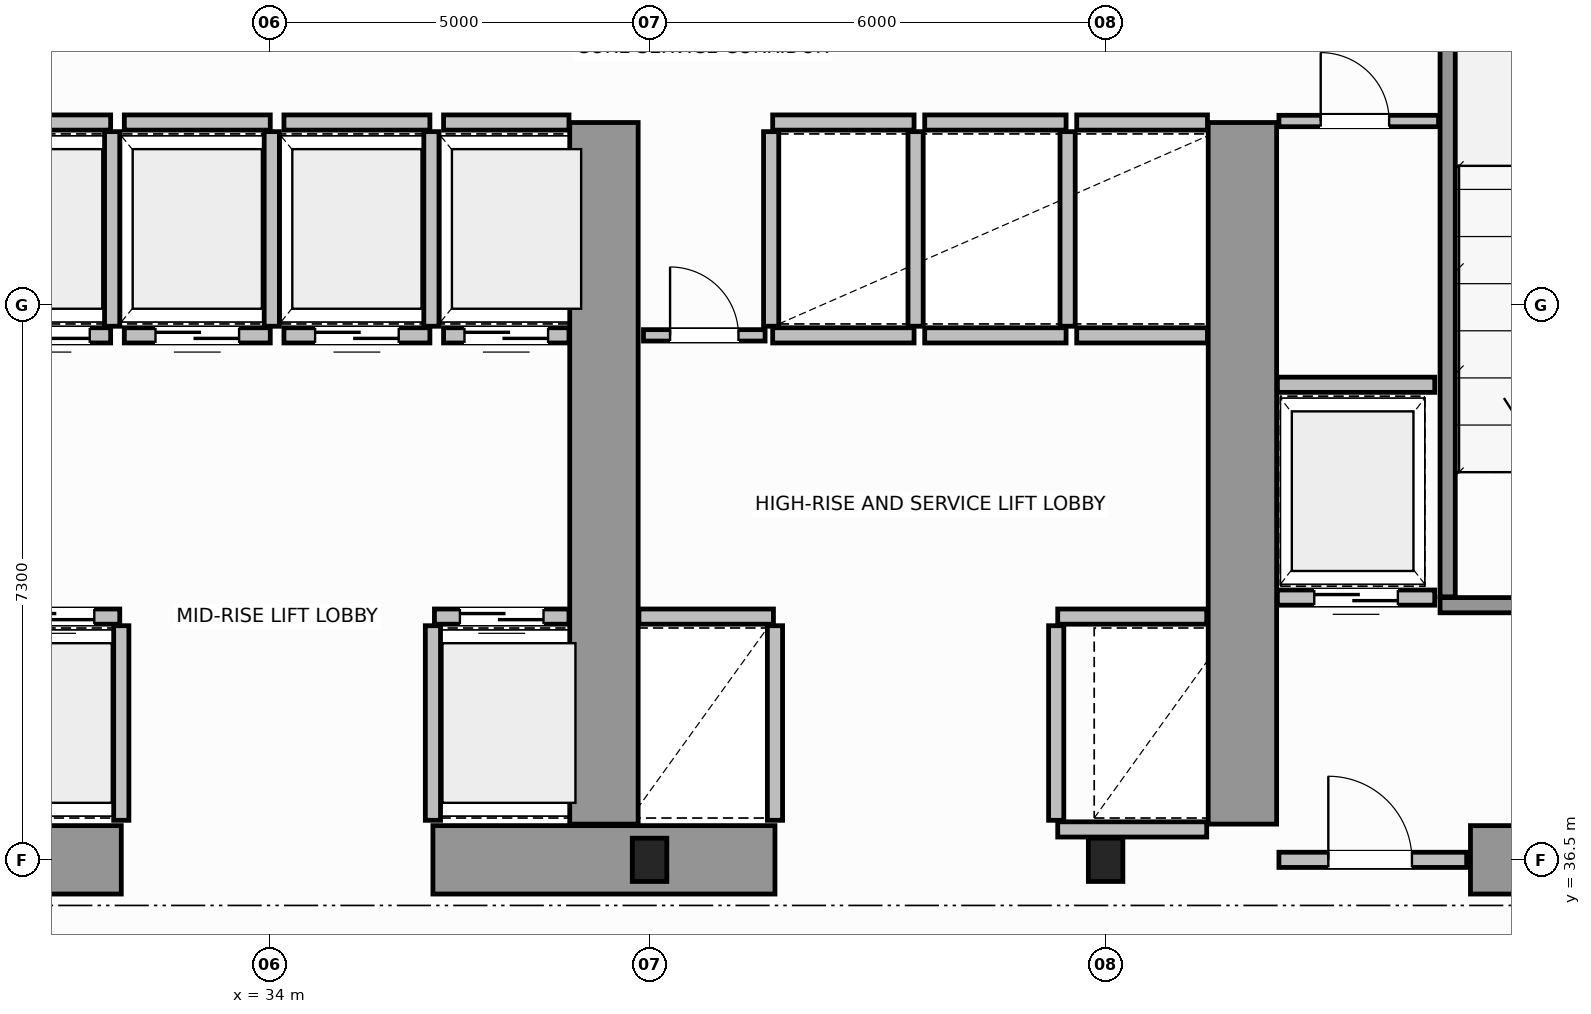
"""IFC4 building model, lengths in metres.
Left out: names, types, materials, properties, quantities, classifications, styles, units other than length and angle.
Written with IfcOpenShell. Run it as: python <this file> out.ifc"""

import sys

from ifc_helpers import new_model, si_unit, direction, frame, frame_2d, origin, origin_2d, place, context, subcontext, project, spatial, rectangle, i_section, extrude, source, transform, mapped, element, fill, save


model = new_model("IFC4")
c1 = context("Model", 3, precision=1e-05, world=origin(), true_north=direction((0.0, 1.0)))
c2 = subcontext(c1, "Body", "Model", "MODEL_VIEW")
j1 = project(units=[si_unit("LENGTHUNIT", "METRE"), si_unit("PLANEANGLEUNIT", "RADIAN")], contexts=[c1])
p1 = place(None, origin())
s1 = spatial("IfcSite", under=j1, at=p1, CompositionType="ELEMENT")
p2 = place(p1, origin())
s2 = spatial("IfcBuilding", under=s1, at=p2, CompositionType="ELEMENT")
p3 = place(p2, frame((0.0, 0.0, 10.0)))
s3 = spatial("IfcBuildingStorey", under=s2, at=p3, CompositionType="ELEMENT", Elevation=10.0)
m1 = source(origin(), c2, "Body", "SweptSolid", [
    extrude(i_section(OverallWidth=0.454, OverallDepth=0.569, WebThickness=0.078, FlangeThickness=0.08, FilletRadius=0.015, at=origin_2d()), origin(), (0.0, 0.0, 1.0), 4.4),
])
for number, where, z_axis, x_axis in (
    (1, (39.0, 36.5, 0.0), (0.0, 0.0, 1.0), (1.0, 0.0, 0.0)),
    (2, (45.0, 36.5, 0.0), (0.0, 0.0, 1.0), (1.0, 0.0, 0.0)),
):
    element("IfcColumn", number, at=place(p3, frame(where, z_axis=z_axis, x_axis=x_axis)), inside=s3, PredefinedType="COLUMN", context=c2, shape_type="MappedRepresentation", body=[
        mapped(m1, transform((0.0, 0.0, 0.0), scale=1.0)),
    ])
for number, where, z_axis, x_axis in (
    (3, (27.55, 36.5, 0.0), (0.0, 0.0, 1.0), (1.0, 0.0, 0.0)),
    (4, (36.15, 36.5, 0.0), (0.0, 0.0, 1.0), (1.0, 0.0, 0.0)),
):
    element("IfcWall", number, at=place(p3, frame(where, z_axis=z_axis, x_axis=x_axis)), inside=s3, PredefinedType="SHEAR", context=c2, shape_type="SweptSolid", body=[
        extrude(rectangle(XDim=4.5, YDim=0.9, at=frame_2d((2.25, 0.0))), origin(), (0.0, 0.0, 1.0), 4.4),
    ])
p4 = place(p3, frame((49.8, 36.5, 0.0), z_axis=(0.0, 0.0, 1.0), x_axis=(1.0, 0.0, 0.0)))
e5 = element("IfcWall", 5, at=p4, inside=s3, PredefinedType="SHEAR", context=c2, shape_type="SweptSolid", body=[
    extrude(rectangle(XDim=3.73, YDim=0.9, at=frame_2d((1.865, 0.0))), origin(), (0.0, 0.0, 1.0), 2.92),
])
for number, where, z_axis, x_axis in (
    (6, (38.4, 36.97, 0.0), (0.0, 0.0, 1.0), (0.0, 1.0, 0.0)),
    (7, (46.8, 36.97, 0.0), (0.0, 0.0, 1.0), (0.0, 1.0, 0.0)),
):
    element("IfcWall", number, at=place(p3, frame(where, z_axis=z_axis, x_axis=x_axis)), inside=s3, PredefinedType="SHEAR", context=c2, shape_type="SweptSolid", body=[
        extrude(rectangle(XDim=9.23, YDim=0.9, at=frame_2d((4.615, 0.0))), origin(), (0.0, 0.0, 1.0), 4.4),
    ])
p5 = place(p3, frame((49.4, 39.85, 0.0), z_axis=(0.0, 0.0, 1.0), x_axis=(1.0, 0.0, 0.0)))
e8 = element("IfcWall", 8, at=p5, inside=s3, PredefinedType="SOLIDWALL", context=c2, shape_type="SweptSolid", body=[
    extrude(rectangle(XDim=4.15, YDim=0.2, at=frame_2d((2.075, 0.0))), origin(), (0.0, 0.0, 1.0), 4.4),
])
p6 = place(p5, frame((1.325, 0.0, 0.0)))
e9 = element("IfcOpeningElement", 9, at=p6, cuts=e8, PredefinedType="OPENING", context=c2, shape_type="SweptSolid", body=[
    extrude(rectangle(XDim=1.1, YDim=2.15, at=frame_2d((0.55, 1.075))), frame((0.0, 0.11, 0.0), z_axis=(0.0, -1.0, 0.0), x_axis=(1.0, 0.0, 0.0)), (0.0, 0.0, 1.0), 0.22),
])
p7 = place(p3, frame((49.5, 39.96, 0.0), z_axis=(0.0, 0.0, 1.0), x_axis=(0.0, 1.0, 0.0)))
e10 = element("IfcWall", 10, at=p7, inside=s3, PredefinedType="SOLIDWALL", context=c2, shape_type="SweptSolid", body=[
    extrude(rectangle(XDim=9.93, YDim=0.2, at=frame_2d((4.965, 0.0))), origin(), (0.0, 0.0, 1.0), 4.4),
])
p8 = place(p3, frame((47.28, 36.5, 0.0), z_axis=(0.0, 0.0, 1.0), x_axis=(1.0, 0.0, 0.0)))
e11 = element("IfcWall", 11, at=p8, inside=s3, PredefinedType="SOLIDWALL", context=c2, shape_type="SweptSolid", body=[
    extrude(rectangle(XDim=2.47, YDim=0.2, at=frame_2d((1.235, 0.0))), origin(), (0.0, 0.0, 1.0), 2.91),
])
p9 = place(p8, frame((0.65, 0.0, 0.0)))
e12 = element("IfcOpeningElement", 12, at=p9, cuts=e11, PredefinedType="OPENING", context=c2, shape_type="SweptSolid", body=[
    extrude(rectangle(XDim=1.1, YDim=2.15, at=frame_2d((0.55, 1.075))), frame((0.0, 0.11, 0.0), z_axis=(0.0, -1.0, 0.0), x_axis=(1.0, 0.0, 0.0)), (0.0, 0.0, 1.0), 0.22),
])
p10 = place(p3, frame((30.26, 39.7, 0.0), z_axis=(0.0, 0.0, 1.0), x_axis=(1.0, 0.0, 0.0)))
e13 = element("IfcWall", 13, at=p10, inside=s3, PredefinedType="SOLIDWALL", context=c2, shape_type="SweptSolid", body=[
    extrude(rectangle(XDim=1.77, YDim=0.2, at=frame_2d((0.885, 0.0))), origin(), (0.0, 0.0, 1.0), 4.12),
])
p11 = place(p10, frame((0.335, 0.0, 0.0)))
e14 = element("IfcOpeningElement", 14, at=p11, cuts=e13, PredefinedType="OPENING", context=c2, shape_type="SweptSolid", body=[
    extrude(rectangle(XDim=1.1, YDim=2.15, at=frame_2d((0.55, 1.075))), frame((0.0, 0.11, 0.0), z_axis=(0.0, -1.0, 0.0), x_axis=(1.0, 0.0, 0.0)), (0.0, 0.0, 1.0), 0.22),
])
p12 = place(p3, frame((32.05, 37.02, 0.0), z_axis=(0.0, 0.0, 1.0), x_axis=(0.0, 1.0, 0.0)))
e15 = element("IfcWall", 15, at=p12, inside=s3, PredefinedType="SOLIDWALL", context=c2, shape_type="SweptSolid", body=[
    extrude(rectangle(XDim=2.56, YDim=0.2, at=frame_2d((1.28, 0.0))), origin(), (0.0, 0.0, 1.0), 4.12),
])
p13 = place(p3, frame((36.17, 39.7, 0.0), z_axis=(0.0, 0.0, 1.0), x_axis=(1.0, 0.0, 0.0)))
e16 = element("IfcWall", 16, at=p13, inside=s3, PredefinedType="SOLIDWALL", context=c2, shape_type="SweptSolid", body=[
    extrude(rectangle(XDim=1.77, YDim=0.2, at=frame_2d((0.885, 0.0))), origin(), (0.0, 0.0, 1.0), 4.12),
])
p14 = place(p13, frame((0.335, 0.0, 0.0)))
e17 = element("IfcOpeningElement", 17, at=p14, cuts=e16, PredefinedType="OPENING", context=c2, shape_type="SweptSolid", body=[
    extrude(rectangle(XDim=1.1, YDim=2.15, at=frame_2d((0.55, 1.075))), frame((0.0, 0.11, 0.0), z_axis=(0.0, -1.0, 0.0), x_axis=(1.0, 0.0, 0.0)), (0.0, 0.0, 1.0), 0.22),
])
p15 = place(p3, frame((36.15, 37.02, 0.0), z_axis=(0.0, 0.0, 1.0), x_axis=(0.0, 1.0, 0.0)))
e18 = element("IfcWall", 18, at=p15, inside=s3, PredefinedType="SOLIDWALL", context=c2, shape_type="SweptSolid", body=[
    extrude(rectangle(XDim=2.56, YDim=0.2, at=frame_2d((1.28, 0.0))), origin(), (0.0, 0.0, 1.0), 4.12),
])
p16 = place(p3, frame((30.26, 43.4, 0.0), z_axis=(0.0, 0.0, 1.0), x_axis=(1.0, 0.0, 0.0)))
e19 = element("IfcWall", 19, at=p16, inside=s3, PredefinedType="SOLIDWALL", context=c2, shape_type="SweptSolid", body=[
    extrude(rectangle(XDim=1.65, YDim=0.2, at=frame_2d((0.825, 0.0))), origin(), (0.0, 0.0, 1.0), 4.12),
])
p17 = place(p16, frame((0.275, 0.0, 0.0)))
e20 = element("IfcOpeningElement", 20, at=p17, cuts=e19, PredefinedType="OPENING", context=c2, shape_type="SweptSolid", body=[
    extrude(rectangle(XDim=1.1, YDim=2.15, at=frame_2d((0.55, 1.075))), frame((0.0, 0.11, 0.0), z_axis=(0.0, -1.0, 0.0), x_axis=(1.0, 0.0, 0.0)), (0.0, 0.0, 1.0), 0.22),
])
p18 = place(p3, frame((30.26, 46.2, 0.0), z_axis=(0.0, 0.0, 1.0), x_axis=(1.0, 0.0, 0.0)))
e21 = element("IfcWall", 21, at=p18, inside=s3, PredefinedType="SOLIDWALL", context=c2, shape_type="SweptSolid", body=[
    extrude(rectangle(XDim=1.65, YDim=0.2, at=frame_2d((0.825, 0.0))), origin(), (0.0, 0.0, 1.0), 4.12),
])
p19 = place(p3, frame((31.93, 43.52, 0.0), z_axis=(0.0, 0.0, 1.0), x_axis=(0.0, 1.0, 0.0)))
e22 = element("IfcWall", 22, at=p19, inside=s3, PredefinedType="SOLIDWALL", context=c2, shape_type="SweptSolid", body=[
    extrude(rectangle(XDim=2.56, YDim=0.2, at=frame_2d((1.28, 0.0))), origin(), (0.0, 0.0, 1.0), 4.12),
])
p20 = place(p3, frame((32.09, 43.4, 0.0), z_axis=(0.0, 0.0, 1.0), x_axis=(1.0, 0.0, 0.0)))
e23 = element("IfcWall", 23, at=p20, inside=s3, PredefinedType="SOLIDWALL", context=c2, shape_type="SweptSolid", body=[
    extrude(rectangle(XDim=1.92, YDim=0.2, at=frame_2d((0.96, 0.0))), origin(), (0.0, 0.0, 1.0), 4.12),
])
p21 = place(p20, frame((0.41, 0.0, 0.0)))
e24 = element("IfcOpeningElement", 24, at=p21, cuts=e23, PredefinedType="OPENING", context=c2, shape_type="SweptSolid", body=[
    extrude(rectangle(XDim=1.1, YDim=2.15, at=frame_2d((0.55, 1.075))), frame((0.0, 0.11, 0.0), z_axis=(0.0, -1.0, 0.0), x_axis=(1.0, 0.0, 0.0)), (0.0, 0.0, 1.0), 0.22),
])
p22 = place(p3, frame((32.09, 46.2, 0.0), z_axis=(0.0, 0.0, 1.0), x_axis=(1.0, 0.0, 0.0)))
e25 = element("IfcWall", 25, at=p22, inside=s3, PredefinedType="SOLIDWALL", context=c2, shape_type="SweptSolid", body=[
    extrude(rectangle(XDim=1.92, YDim=0.2, at=frame_2d((0.96, 0.0))), origin(), (0.0, 0.0, 1.0), 4.12),
])
p23 = place(p3, frame((34.03, 43.52, 0.0), z_axis=(0.0, 0.0, 1.0), x_axis=(0.0, 1.0, 0.0)))
e26 = element("IfcWall", 26, at=p23, inside=s3, PredefinedType="SOLIDWALL", context=c2, shape_type="SweptSolid", body=[
    extrude(rectangle(XDim=2.56, YDim=0.2, at=frame_2d((1.28, 0.0))), origin(), (0.0, 0.0, 1.0), 4.12),
])
p24 = place(p3, frame((34.19, 43.4, 0.0), z_axis=(0.0, 0.0, 1.0), x_axis=(1.0, 0.0, 0.0)))
e27 = element("IfcWall", 27, at=p24, inside=s3, PredefinedType="SOLIDWALL", context=c2, shape_type="SweptSolid", body=[
    extrude(rectangle(XDim=1.92, YDim=0.2, at=frame_2d((0.96, 0.0))), origin(), (0.0, 0.0, 1.0), 4.12),
])
p25 = place(p24, frame((0.41, 0.0, 0.0)))
e28 = element("IfcOpeningElement", 28, at=p25, cuts=e27, PredefinedType="OPENING", context=c2, shape_type="SweptSolid", body=[
    extrude(rectangle(XDim=1.1, YDim=2.15, at=frame_2d((0.55, 1.075))), frame((0.0, 0.11, 0.0), z_axis=(0.0, -1.0, 0.0), x_axis=(1.0, 0.0, 0.0)), (0.0, 0.0, 1.0), 0.22),
])
p26 = place(p3, frame((34.19, 46.2, 0.0), z_axis=(0.0, 0.0, 1.0), x_axis=(1.0, 0.0, 0.0)))
e29 = element("IfcWall", 29, at=p26, inside=s3, PredefinedType="SOLIDWALL", context=c2, shape_type="SweptSolid", body=[
    extrude(rectangle(XDim=1.92, YDim=0.2, at=frame_2d((0.96, 0.0))), origin(), (0.0, 0.0, 1.0), 4.12),
])
p27 = place(p3, frame((36.13, 43.52, 0.0), z_axis=(0.0, 0.0, 1.0), x_axis=(0.0, 1.0, 0.0)))
e30 = element("IfcWall", 30, at=p27, inside=s3, PredefinedType="SOLIDWALL", context=c2, shape_type="SweptSolid", body=[
    extrude(rectangle(XDim=2.56, YDim=0.2, at=frame_2d((1.28, 0.0))), origin(), (0.0, 0.0, 1.0), 4.12),
])
p28 = place(p3, frame((36.29, 43.4, 0.0), z_axis=(0.0, 0.0, 1.0), x_axis=(1.0, 0.0, 0.0)))
e31 = element("IfcWall", 31, at=p28, inside=s3, PredefinedType="SOLIDWALL", context=c2, shape_type="SweptSolid", body=[
    extrude(rectangle(XDim=1.65, YDim=0.2, at=frame_2d((0.825, 0.0))), origin(), (0.0, 0.0, 1.0), 4.12),
])
p29 = place(p28, frame((0.275, 0.0, 0.0)))
e32 = element("IfcOpeningElement", 32, at=p29, cuts=e31, PredefinedType="OPENING", context=c2, shape_type="SweptSolid", body=[
    extrude(rectangle(XDim=1.1, YDim=2.15, at=frame_2d((0.55, 1.075))), frame((0.0, 0.11, 0.0), z_axis=(0.0, -1.0, 0.0), x_axis=(1.0, 0.0, 0.0)), (0.0, 0.0, 1.0), 0.22),
])
p30 = place(p3, frame((36.29, 46.2, 0.0), z_axis=(0.0, 0.0, 1.0), x_axis=(1.0, 0.0, 0.0)))
e33 = element("IfcWall", 33, at=p30, inside=s3, PredefinedType="SOLIDWALL", context=c2, shape_type="SweptSolid", body=[
    extrude(rectangle(XDim=1.65, YDim=0.2, at=frame_2d((0.825, 0.0))), origin(), (0.0, 0.0, 1.0), 4.12),
])
p31 = place(p3, frame((38.86, 39.7, 0.0), z_axis=(0.0, 0.0, 1.0), x_axis=(1.0, 0.0, 0.0)))
e34 = element("IfcWall", 34, at=p31, inside=s3, PredefinedType="SOLIDWALL", context=c2, shape_type="SweptSolid", body=[
    extrude(rectangle(XDim=1.77, YDim=0.2, at=frame_2d((0.885, 0.0))), origin(), (0.0, 0.0, 1.0), 4.12),
])
p32 = place(p3, frame((40.65, 37.02, 0.0), z_axis=(0.0, 0.0, 1.0), x_axis=(0.0, 1.0, 0.0)))
e35 = element("IfcWall", 35, at=p32, inside=s3, PredefinedType="SOLIDWALL", context=c2, shape_type="SweptSolid", body=[
    extrude(rectangle(XDim=2.56, YDim=0.2, at=frame_2d((1.28, 0.0))), origin(), (0.0, 0.0, 1.0), 4.12),
])
p33 = place(p3, frame((44.37, 39.7, 0.0), z_axis=(0.0, 0.0, 1.0), x_axis=(1.0, 0.0, 0.0)))
e36 = element("IfcWall", 36, at=p33, inside=s3, PredefinedType="SOLIDWALL", context=c2, shape_type="SweptSolid", body=[
    extrude(rectangle(XDim=1.96, YDim=0.2, at=frame_2d((0.98, 0.0))), origin(), (0.0, 0.0, 1.0), 4.12),
])
p34 = place(p3, frame((44.37, 36.9, 0.0), z_axis=(0.0, 0.0, 1.0), x_axis=(1.0, 0.0, 0.0)))
e37 = element("IfcWall", 37, at=p34, inside=s3, PredefinedType="SOLIDWALL", context=c2, shape_type="SweptSolid", body=[
    extrude(rectangle(XDim=1.96, YDim=0.2, at=frame_2d((0.98, 0.0))), origin(), (0.0, 0.0, 1.0), 2.91),
])
p35 = place(p3, frame((44.35, 37.02, 0.0), z_axis=(0.0, 0.0, 1.0), x_axis=(0.0, 1.0, 0.0)))
e38 = element("IfcWall", 38, at=p35, inside=s3, PredefinedType="SOLIDWALL", context=c2, shape_type="SweptSolid", body=[
    extrude(rectangle(XDim=2.56, YDim=0.2, at=frame_2d((1.28, 0.0))), origin(), (0.0, 0.0, 1.0), 4.12),
])
for number, where, z_axis, x_axis in (
    (39, (40.62, 43.4, 0.0), (0.0, 0.0, 1.0), (1.0, 0.0, 0.0)),
    (40, (40.62, 46.2, 0.0), (0.0, 0.0, 1.0), (1.0, 0.0, 0.0)),
):
    element("IfcWall", number, at=place(p3, frame(where, z_axis=z_axis, x_axis=x_axis)), inside=s3, PredefinedType="SOLIDWALL", context=c2, shape_type="SweptSolid", body=[
        extrude(rectangle(XDim=1.86, YDim=0.2, at=frame_2d((0.93, 0.0))), origin(), (0.0, 0.0, 1.0), 4.12),
    ])
for number, where, z_axis, x_axis in (
    (41, (40.6, 43.52, 0.0), (0.0, 0.0, 1.0), (0.0, 1.0, 0.0)),
    (42, (42.5, 43.52, 0.0), (0.0, 0.0, 1.0), (0.0, 1.0, 0.0)),
):
    element("IfcWall", number, at=place(p3, frame(where, z_axis=z_axis, x_axis=x_axis)), inside=s3, PredefinedType="SOLIDWALL", context=c2, shape_type="SweptSolid", body=[
        extrude(rectangle(XDim=2.56, YDim=0.2, at=frame_2d((1.28, 0.0))), origin(), (0.0, 0.0, 1.0), 4.12),
    ])
for number, where, z_axis, x_axis in (
    (43, (42.62, 43.4, 0.0), (0.0, 0.0, 1.0), (1.0, 0.0, 0.0)),
    (44, (42.62, 46.2, 0.0), (0.0, 0.0, 1.0), (1.0, 0.0, 0.0)),
):
    element("IfcWall", number, at=place(p3, frame(where, z_axis=z_axis, x_axis=x_axis)), inside=s3, PredefinedType="SOLIDWALL", context=c2, shape_type="SweptSolid", body=[
        extrude(rectangle(XDim=1.86, YDim=0.2, at=frame_2d((0.93, 0.0))), origin(), (0.0, 0.0, 1.0), 4.12),
    ])
p36 = place(p3, frame((44.5, 43.52, 0.0), z_axis=(0.0, 0.0, 1.0), x_axis=(0.0, 1.0, 0.0)))
e45 = element("IfcWall", 45, at=p36, inside=s3, PredefinedType="SOLIDWALL", context=c2, shape_type="SweptSolid", body=[
    extrude(rectangle(XDim=2.56, YDim=0.2, at=frame_2d((1.28, 0.0))), origin(), (0.0, 0.0, 1.0), 4.12),
])
for number, where, z_axis, x_axis in (
    (46, (44.62, 43.4, 0.0), (0.0, 0.0, 1.0), (1.0, 0.0, 0.0)),
    (47, (44.62, 46.2, 0.0), (0.0, 0.0, 1.0), (1.0, 0.0, 0.0)),
):
    element("IfcWall", number, at=place(p3, frame(where, z_axis=z_axis, x_axis=x_axis)), inside=s3, PredefinedType="SOLIDWALL", context=c2, shape_type="SweptSolid", body=[
        extrude(rectangle(XDim=1.72, YDim=0.2, at=frame_2d((0.86, 0.0))), origin(), (0.0, 0.0, 1.0), 4.12),
    ])
p37 = place(p3, frame((47.26, 39.95, 0.0), z_axis=(0.0, 0.0, 1.0), x_axis=(1.0, 0.0, 0.0)))
e48 = element("IfcWall", 48, at=p37, inside=s3, PredefinedType="SOLIDWALL", context=c2, shape_type="SweptSolid", body=[
    extrude(rectangle(XDim=2.07, YDim=0.2, at=frame_2d((1.035, 0.0))), origin(), (0.0, 0.0, 1.0), 4.12),
])
p38 = place(p37, frame((0.485, 0.0, 0.0)))
e49 = element("IfcOpeningElement", 49, at=p38, cuts=e48, PredefinedType="OPENING", context=c2, shape_type="SweptSolid", body=[
    extrude(rectangle(XDim=1.1, YDim=2.15, at=frame_2d((0.55, 1.075))), frame((0.0, 0.11, 0.0), z_axis=(0.0, -1.0, 0.0), x_axis=(1.0, 0.0, 0.0)), (0.0, 0.0, 1.0), 0.22),
])
p39 = place(p3, frame((47.26, 42.75, 0.0), z_axis=(0.0, 0.0, 1.0), x_axis=(1.0, 0.0, 0.0)))
e50 = element("IfcWall", 50, at=p39, inside=s3, PredefinedType="SOLIDWALL", context=c2, shape_type="SweptSolid", body=[
    extrude(rectangle(XDim=2.07, YDim=0.2, at=frame_2d((1.035, 0.0))), origin(), (0.0, 0.0, 1.0), 4.12),
])
p40 = place(p3, frame((47.28, 46.22, 0.0), z_axis=(0.0, 0.0, 1.0), x_axis=(1.0, 0.0, 0.0)))
e51 = element("IfcWall", 51, at=p40, inside=s3, PredefinedType="PARTITIONING", context=c2, shape_type="SweptSolid", body=[
    extrude(rectangle(XDim=2.1, YDim=0.15, at=frame_2d((1.05, 0.0))), origin(), (0.0, 0.0, 1.0), 4.12),
])
p41 = place(p40, frame((0.55, 0.0, 0.0)))
e52 = element("IfcOpeningElement", 52, at=p41, cuts=e51, PredefinedType="OPENING", context=c2, shape_type="SweptSolid", body=[
    extrude(rectangle(XDim=0.9, YDim=2.1, at=frame_2d((0.45, 1.05))), frame((0.0, 0.085, 0.0), z_axis=(0.0, -1.0, 0.0), x_axis=(1.0, 0.0, 0.0)), (0.0, 0.0, 1.0), 0.17),
])
p42 = place(p3, frame((38.92, 43.4, 0.0), z_axis=(0.0, 0.0, 1.0), x_axis=(1.0, 0.0, 0.0)))
e53 = element("IfcWall", 53, at=p42, inside=s3, PredefinedType="PARTITIONING", context=c2, shape_type="SweptSolid", body=[
    extrude(rectangle(XDim=1.6, YDim=0.15, at=frame_2d((0.8, 0.0))), origin(), (0.0, 0.0, 1.0), 4.12),
])
p43 = place(p42, frame((0.35, 0.0, 0.0)))
e54 = element("IfcOpeningElement", 54, at=p43, cuts=e53, PredefinedType="OPENING", context=c2, shape_type="SweptSolid", body=[
    extrude(rectangle(XDim=0.9, YDim=2.1, at=frame_2d((0.45, 1.05))), frame((0.0, 0.085, 0.0), z_axis=(0.0, -1.0, 0.0), x_axis=(1.0, 0.0, 0.0)), (0.0, 0.0, 1.0), 0.17),
])
m2 = source(origin(), c2, "Body", "SweptSolid", [
    extrude(rectangle(XDim=1.1, YDim=2.15, at=frame_2d((0.55, 1.075))), frame((0.0, 0.025, 0.0), z_axis=(0.0, -1.0, 0.0), x_axis=(1.0, 0.0, 0.0)), (0.0, 0.0, 1.0), 0.05),
])
p44 = place(p9, origin())
e55 = element("IfcDoor", 55, at=p44, inside=s3, OperationType="SINGLE_SWING_LEFT", PredefinedType="DOOR", context=c2, shape_type="MappedRepresentation", body=[
    mapped(m2, transform((0.0, 0.0, 0.0), scale=1.0)),
])
fill(e12, e55)
p45 = place(p11, origin())
e56 = element("IfcDoor", 56, at=p45, inside=s3, OperationType="DOUBLE_DOOR_SLIDING", PredefinedType="DOOR", context=c2, shape_type="MappedRepresentation", body=[
    mapped(m2, transform((0.0, 0.0, 0.0), scale=1.0)),
])
fill(e14, e56)
p46 = place(p14, origin())
e57 = element("IfcDoor", 57, at=p46, inside=s3, OperationType="DOUBLE_DOOR_SLIDING", PredefinedType="DOOR", context=c2, shape_type="MappedRepresentation", body=[
    mapped(m2, transform((0.0, 0.0, 0.0), scale=1.0)),
])
fill(e17, e57)
p47 = place(p17, origin())
e58 = element("IfcDoor", 58, at=p47, inside=s3, OperationType="DOUBLE_DOOR_SLIDING", PredefinedType="DOOR", context=c2, shape_type="MappedRepresentation", body=[
    mapped(m2, transform((0.0, 0.0, 0.0), scale=1.0)),
])
fill(e20, e58)
p48 = place(p21, origin())
e59 = element("IfcDoor", 59, at=p48, inside=s3, OperationType="DOUBLE_DOOR_SLIDING", PredefinedType="DOOR", context=c2, shape_type="MappedRepresentation", body=[
    mapped(m2, transform((0.0, 0.0, 0.0), scale=1.0)),
])
fill(e24, e59)
p49 = place(p25, origin())
e60 = element("IfcDoor", 60, at=p49, inside=s3, OperationType="DOUBLE_DOOR_SLIDING", PredefinedType="DOOR", context=c2, shape_type="MappedRepresentation", body=[
    mapped(m2, transform((0.0, 0.0, 0.0), scale=1.0)),
])
fill(e28, e60)
p50 = place(p29, origin())
e61 = element("IfcDoor", 61, at=p50, inside=s3, OperationType="DOUBLE_DOOR_SLIDING", PredefinedType="DOOR", context=c2, shape_type="MappedRepresentation", body=[
    mapped(m2, transform((0.0, 0.0, 0.0), scale=1.0)),
])
fill(e32, e61)
p51 = place(p38, origin())
e62 = element("IfcDoor", 62, at=p51, inside=s3, OperationType="DOUBLE_DOOR_SLIDING", PredefinedType="DOOR", context=c2, shape_type="MappedRepresentation", body=[
    mapped(m2, transform((0.0, 0.0, 0.0), scale=1.0)),
])
fill(e49, e62)
m3 = source(origin(), c2, "Body", "SweptSolid", [
    extrude(rectangle(XDim=0.9, YDim=2.1, at=frame_2d((0.45, 1.05))), frame((0.0, 0.025, 0.0), z_axis=(0.0, -1.0, 0.0), x_axis=(1.0, 0.0, 0.0)), (0.0, 0.0, 1.0), 0.05),
])
p52 = place(p41, origin())
e63 = element("IfcDoor", 63, at=p52, inside=s3, OperationType="SINGLE_SWING_RIGHT", PredefinedType="DOOR", context=c2, shape_type="MappedRepresentation", body=[
    mapped(m3, transform((0.0, 0.0, 0.0), scale=1.0)),
])
fill(e52, e63)
p53 = place(p43, origin())
e64 = element("IfcDoor", 64, at=p53, inside=s3, OperationType="SINGLE_SWING_LEFT", PredefinedType="DOOR", context=c2, shape_type="MappedRepresentation", body=[
    mapped(m3, transform((0.0, 0.0, 0.0), scale=1.0)),
])
fill(e54, e64)
save(model, sys.argv[1])
